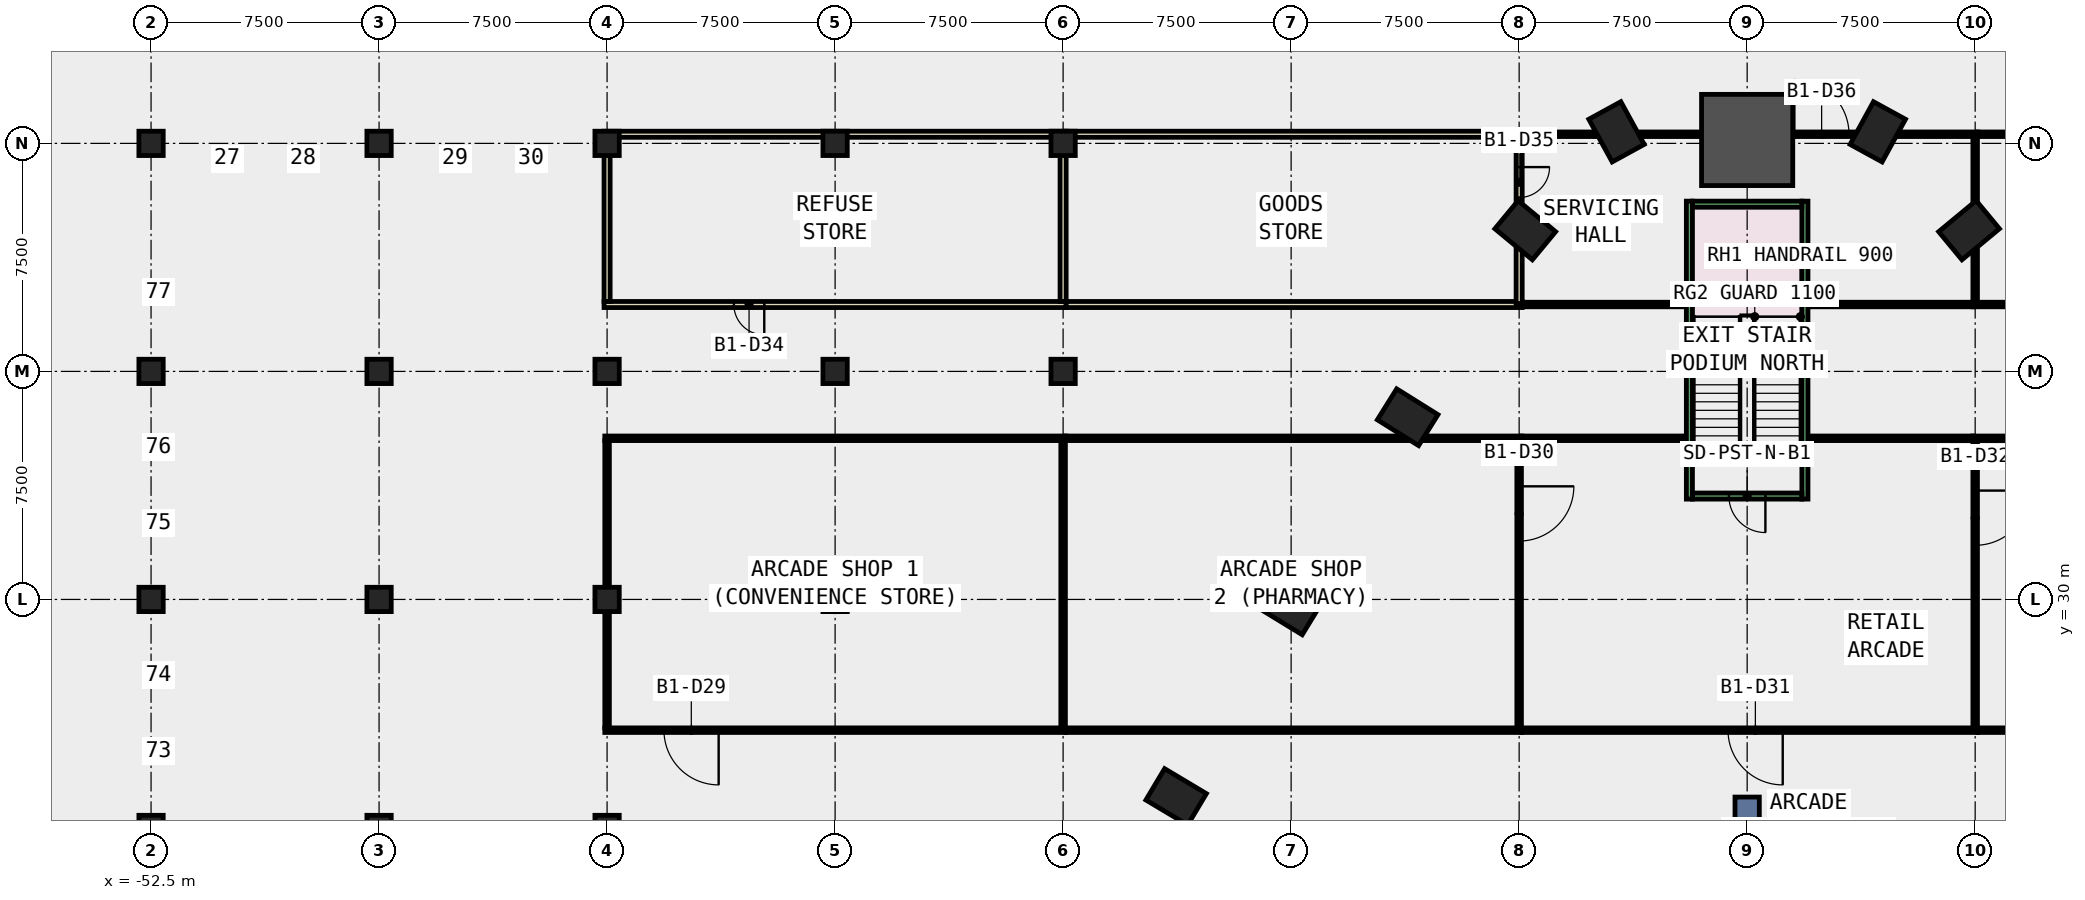
"""IFC4 building model, lengths in metres.
Left out: names, types, materials, properties, quantities, classifications, styles, units other than length and angle.
Written with IfcOpenShell. Run it as: python <this file> out.ifc"""

import sys

from ifc_helpers import new_model, si_unit, direction, frame, frame_2d, origin, origin_2d, place, context, subcontext, project, spatial, rectangle, extrude, element, fill, save


model = new_model("IFC4")
c1 = context("Model", 3, precision=1e-05, world=origin(), true_north=direction((0.0, 1.0)))
c2 = subcontext(c1, "Body", "Model", "MODEL_VIEW")
j1 = project(units=[si_unit("LENGTHUNIT", "METRE"), si_unit("PLANEANGLEUNIT", "RADIAN")], contexts=[c1])
p1 = place(None, origin())
s1 = spatial("IfcSite", under=j1, at=p1, CompositionType="ELEMENT")
p2 = place(p1, origin())
s2 = spatial("IfcBuilding", under=s1, at=p2, CompositionType="ELEMENT")
p3 = place(p2, frame((0.0, 0.0, -5.5)))
s3 = spatial("IfcBuildingStorey", under=s2, at=p3, CompositionType="ELEMENT", Elevation=-5.5)
for number, where, z_axis, x_axis in (
    (1, (-52.5, 22.5, -0.42), (0.0, 0.0, 1.0), (1.0, 0.0, 0.0)),
    (2, (-52.5, 30.0, -0.42), (0.0, 0.0, 1.0), (1.0, 0.0, 0.0)),
    (3, (-52.5, 37.5, -0.42), (0.0, 0.0, 1.0), (1.0, 0.0, 0.0)),
    (4, (-52.5, 45.0, -0.42), (0.0, 0.0, 1.0), (1.0, 0.0, 0.0)),
    (5, (-45.0, 22.5, -0.42), (0.0, 0.0, 1.0), (1.0, 0.0, 0.0)),
    (6, (-45.0, 30.0, -0.42), (0.0, 0.0, 1.0), (1.0, 0.0, 0.0)),
    (7, (-45.0, 37.5, -0.42), (0.0, 0.0, 1.0), (1.0, 0.0, 0.0)),
    (8, (-45.0, 45.0, -0.42), (0.0, 0.0, 1.0), (1.0, 0.0, 0.0)),
    (9, (-37.5, 22.5, -0.42), (0.0, 0.0, 1.0), (1.0, 0.0, 0.0)),
    (10, (-37.5, 30.0, -0.42), (0.0, 0.0, 1.0), (1.0, 0.0, 0.0)),
    (11, (-37.5, 37.5, -0.42), (0.0, 0.0, 1.0), (1.0, 0.0, 0.0)),
    (12, (-37.5, 45.0, -0.42), (0.0, 0.0, 1.0), (1.0, 0.0, 0.0)),
    (13, (-30.0, 30.0, -0.42), (0.0, 0.0, 1.0), (1.0, 0.0, 0.0)),
    (14, (-30.0, 37.5, -0.42), (0.0, 0.0, 1.0), (1.0, 0.0, 0.0)),
    (15, (-30.0, 45.0, -0.42), (0.0, 0.0, 1.0), (1.0, 0.0, 0.0)),
    (16, (-22.5, 37.5, -0.42), (0.0, 0.0, 1.0), (1.0, 0.0, 0.0)),
    (17, (-22.5, 45.0, -0.42), (0.0, 0.0, 1.0), (1.0, 0.0, 0.0)),
):
    element("IfcColumn", number, at=place(p3, frame(where, z_axis=z_axis, x_axis=x_axis)), inside=s3, PredefinedType="COLUMN", context=c2, shape_type="SweptSolid", body=[
        extrude(rectangle(XDim=0.8, YDim=0.8, at=origin_2d()), origin(), (0.0, 0.0, 1.0), 5.72),
    ])
for number, where, z_axis, x_axis in (
    (18, (7.299, 42.144, -0.42), (0.0, 0.0, 1.0), (-0.638, 0.77, 0.0)),
    (19, (4.297, 45.38, -0.42), (0.0, 0.0, 1.0), (-0.877, 0.48, 0.0)),
):
    element("IfcColumn", number, at=place(p3, frame(where, z_axis=z_axis, x_axis=x_axis)), inside=s3, PredefinedType="COLUMN", context=c2, shape_type="SweptSolid", body=[
        extrude(rectangle(XDim=1.2, YDim=1.6, at=origin_2d()), origin(), (0.0, 0.0, 1.0), 5.42),
    ])
p4 = place(p3, frame((0.0, 45.112, -0.42), z_axis=(0.0, 0.0, 1.0), x_axis=(0.0, 1.0, 0.0)))
e20 = element("IfcColumn", 20, at=p4, inside=s3, PredefinedType="COLUMN", context=c2, shape_type="SweptSolid", body=[
    extrude(rectangle(XDim=3.0, YDim=3.0, at=origin_2d()), origin(), (0.0, 0.0, 1.0), 5.42),
])
for number, where, z_axis, x_axis in (
    (21, (-4.297, 45.38, -0.42), (0.0, 0.0, 1.0), (0.877, 0.48, 0.0)),
    (22, (-7.299, 42.144, -0.42), (0.0, 0.0, 1.0), (0.638, 0.77, 0.0)),
    (23, (-11.167, 35.993, -0.42), (0.0, 0.0, 1.0), (0.53, 0.848, 0.0)),
    (24, (-15.005, 29.769, -0.42), (0.0, 0.0, 1.0), (0.522, 0.853, 0.0)),
    (25, (-18.782, 23.508, -0.42), (0.0, 0.0, 1.0), (0.513, 0.858, 0.0)),
):
    element("IfcColumn", number, at=place(p3, frame(where, z_axis=z_axis, x_axis=x_axis)), inside=s3, PredefinedType="COLUMN", context=c2, shape_type="SweptSolid", body=[
        extrude(rectangle(XDim=1.2, YDim=1.6, at=origin_2d()), origin(), (0.0, 0.0, 1.0), 5.42),
    ])
p5 = place(p3, frame((0.0, 14.5, -0.42), z_axis=(0.0, 0.0, 1.0), x_axis=(0.0, 1.0, 0.0)))
e26 = element("IfcWall", 26, at=p5, inside=s3, PredefinedType="SHEAR", context=c2, shape_type="SweptSolid", body=[
    extrude(rectangle(XDim=9.0, YDim=0.8, at=frame_2d((4.5, 0.0))), origin(), (0.0, 0.0, 1.0), 5.42),
])
p6 = place(p3, frame((-37.575, 35.3, 0.0), z_axis=(0.0, 0.0, 1.0), x_axis=(1.0, 0.0, 0.0)))
e27 = element("IfcWall", 27, at=p6, inside=s3, PredefinedType="PARTITIONING", context=c2, shape_type="SweptSolid", body=[
    extrude(rectangle(XDim=15.15, YDim=0.15, at=frame_2d((7.575, 0.0))), origin(), (0.0, 0.0, 1.0), 4.9),
])
p7 = place(p3, frame((-22.425, 25.7, 0.0), z_axis=(0.0, 0.0, 1.0), x_axis=(-1.0, 0.0, 0.0)))
e28 = element("IfcWall", 28, at=p7, inside=s3, PredefinedType="PARTITIONING", context=c2, shape_type="SweptSolid", body=[
    extrude(rectangle(XDim=15.15, YDim=0.15, at=frame_2d((7.575, 0.0))), origin(), (0.0, 0.0, 1.0), 4.9),
])
p8 = place(p7, frame((11.405, 0.0, 0.0)))
e29 = element("IfcOpeningElement", 29, at=p8, cuts=e28, PredefinedType="OPENING", context=c2, shape_type="SweptSolid", body=[
    extrude(rectangle(XDim=1.8, YDim=2.1, at=frame_2d((0.9, 1.05))), frame((0.0, 0.085, 0.0), z_axis=(0.0, -1.0, 0.0), x_axis=(1.0, 0.0, 0.0)), (0.0, 0.0, 1.0), 0.17),
])
p9 = place(p3, frame((-37.5, 25.775, 0.0), z_axis=(0.0, 0.0, 1.0), x_axis=(0.0, 1.0, 0.0)))
e30 = element("IfcWall", 30, at=p9, inside=s3, PredefinedType="PARTITIONING", context=c2, shape_type="SweptSolid", body=[
    extrude(rectangle(XDim=9.45, YDim=0.15, at=frame_2d((4.725, 0.0))), origin(), (0.0, 0.0, 1.0), 4.9),
])
for number, where, z_axis, x_axis in (
    (31, (-22.425, 35.3, 0.0), (0.0, 0.0, 1.0), (1.0, 0.0, 0.0)),
    (32, (-7.425, 25.7, 0.0), (0.0, 0.0, 1.0), (-1.0, 0.0, 0.0)),
):
    element("IfcWall", number, at=place(p3, frame(where, z_axis=z_axis, x_axis=x_axis)), inside=s3, PredefinedType="PARTITIONING", context=c2, shape_type="SweptSolid", body=[
        extrude(rectangle(XDim=15.0, YDim=0.15, at=frame_2d((7.5, 0.0))), origin(), (0.0, 0.0, 1.0), 4.9),
    ])
for number, where, z_axis, x_axis in (
    (33, (-7.425, 35.3, 0.0), (0.0, 0.0, 1.0), (1.0, 0.0, 0.0)),
    (34, (2.0, 35.3, 0.0), (0.0, 0.0, 1.0), (1.0, 0.0, 0.0)),
):
    element("IfcWall", number, at=place(p3, frame(where, z_axis=z_axis, x_axis=x_axis)), inside=s3, PredefinedType="PARTITIONING", context=c2, shape_type="SweptSolid", body=[
        extrude(rectangle(XDim=5.425, YDim=0.15, at=frame_2d((2.712, 0.0))), origin(), (0.0, 0.0, 1.0), 4.9),
    ])
p10 = place(p3, frame((7.575, 25.7, 0.0), z_axis=(0.0, 0.0, 1.0), x_axis=(-1.0, 0.0, 0.0)))
e35 = element("IfcWall", 35, at=p10, inside=s3, PredefinedType="PARTITIONING", context=c2, shape_type="SweptSolid", body=[
    extrude(rectangle(XDim=15.0, YDim=0.15, at=frame_2d((7.5, 0.0))), origin(), (0.0, 0.0, 1.0), 4.9),
])
p11 = place(p10, frame((6.405, 0.0, 0.0)))
e36 = element("IfcOpeningElement", 36, at=p11, cuts=e35, PredefinedType="OPENING", context=c2, shape_type="SweptSolid", body=[
    extrude(rectangle(XDim=1.8, YDim=2.1, at=frame_2d((0.9, 1.05))), frame((0.0, 0.085, 0.0), z_axis=(0.0, -1.0, 0.0), x_axis=(1.0, 0.0, 0.0)), (0.0, 0.0, 1.0), 0.17),
])
p12 = place(p3, frame((7.425, 35.3, 0.0), z_axis=(0.0, 0.0, 1.0), x_axis=(1.0, 0.0, 0.0)))
e37 = element("IfcWall", 37, at=p12, inside=s3, PredefinedType="PARTITIONING", context=c2, shape_type="SweptSolid", body=[
    extrude(rectangle(XDim=15.15, YDim=0.15, at=frame_2d((7.575, 0.0))), origin(), (0.0, 0.0, 1.0), 4.9),
])
p13 = place(p3, frame((22.575, 25.7, 0.0), z_axis=(0.0, 0.0, 1.0), x_axis=(-1.0, 0.0, 0.0)))
e38 = element("IfcWall", 38, at=p13, inside=s3, PredefinedType="PARTITIONING", context=c2, shape_type="SweptSolid", body=[
    extrude(rectangle(XDim=15.0, YDim=0.15, at=frame_2d((7.5, 0.0))), origin(), (0.0, 0.0, 1.0), 4.9),
])
p14 = place(p3, frame((-37.6, 45.3, 0.0), z_axis=(0.0, 0.0, 1.0), x_axis=(1.0, 0.0, 0.0)))
e39 = element("IfcWall", 39, at=p14, inside=s3, PredefinedType="PARTITIONING", context=c2, shape_type="SweptSolid", body=[
    extrude(rectangle(XDim=15.2, YDim=0.2, at=frame_2d((7.6, 0.0))), origin(), (0.0, 0.0, 1.0), 4.9),
])
p15 = place(p3, frame((-22.4, 39.7, 0.0), z_axis=(0.0, 0.0, 1.0), x_axis=(-1.0, 0.0, 0.0)))
e40 = element("IfcWall", 40, at=p15, inside=s3, PredefinedType="PARTITIONING", context=c2, shape_type="SweptSolid", body=[
    extrude(rectangle(XDim=15.2, YDim=0.2, at=frame_2d((7.6, 0.0))), origin(), (0.0, 0.0, 1.0), 4.9),
])
p16 = place(p15, frame((9.93, 0.0, 0.0)))
e41 = element("IfcOpeningElement", 41, at=p16, cuts=e40, PredefinedType="OPENING", context=c2, shape_type="SweptSolid", body=[
    extrude(rectangle(XDim=1.0, YDim=2.1, at=frame_2d((0.5, 1.05))), frame((0.0, 0.11, 0.0), z_axis=(0.0, -1.0, 0.0), x_axis=(1.0, 0.0, 0.0)), (0.0, 0.0, 1.0), 0.22),
])
p17 = place(p3, frame((-37.5, 39.8, 0.0), z_axis=(0.0, 0.0, 1.0), x_axis=(0.0, 1.0, 0.0)))
e42 = element("IfcWall", 42, at=p17, inside=s3, PredefinedType="PARTITIONING", context=c2, shape_type="SweptSolid", body=[
    extrude(rectangle(XDim=5.4, YDim=0.2, at=frame_2d((2.7, 0.0))), origin(), (0.0, 0.0, 1.0), 4.9),
])
for number, where, z_axis, x_axis in (
    (43, (-22.4, 45.3, 0.0), (0.0, 0.0, 1.0), (1.0, 0.0, 0.0)),
    (44, (-7.4, 39.7, 0.0), (0.0, 0.0, 1.0), (-1.0, 0.0, 0.0)),
):
    element("IfcWall", number, at=place(p3, frame(where, z_axis=z_axis, x_axis=x_axis)), inside=s3, PredefinedType="PARTITIONING", context=c2, shape_type="SweptSolid", body=[
        extrude(rectangle(XDim=15.0, YDim=0.2, at=frame_2d((7.5, 0.0))), origin(), (0.0, 0.0, 1.0), 4.9),
    ])
p18 = place(p3, frame((-7.4, 45.3, 0.0), z_axis=(0.0, 0.0, 1.0), x_axis=(1.0, 0.0, 0.0)))
e45 = element("IfcWall", 45, at=p18, inside=s3, PredefinedType="PARTITIONING", context=c2, shape_type="SweptSolid", body=[
    extrude(rectangle(XDim=14.975, YDim=0.15, at=frame_2d((7.487, 0.0))), origin(), (0.0, 0.0, 1.0), 4.9),
])
p19 = place(p18, frame((8.95, 0.0, 0.0)))
e46 = element("IfcOpeningElement", 46, at=p19, cuts=e45, PredefinedType="OPENING", context=c2, shape_type="SweptSolid", body=[
    extrude(rectangle(XDim=1.8, YDim=2.1, at=frame_2d((0.9, 1.05))), frame((0.0, 0.085, 0.0), z_axis=(0.0, -1.0, 0.0), x_axis=(1.0, 0.0, 0.0)), (0.0, 0.0, 1.0), 0.17),
])
p20 = place(p3, frame((7.425, 39.7, 0.0), z_axis=(0.0, 0.0, 1.0), x_axis=(-1.0, 0.0, 0.0)))
e47 = element("IfcWall", 47, at=p20, inside=s3, PredefinedType="PARTITIONING", context=c2, shape_type="SweptSolid", body=[
    extrude(rectangle(XDim=5.425, YDim=0.15, at=frame_2d((2.712, 0.0))), origin(), (0.0, 0.0, 1.0), 4.9),
])
p21 = place(p3, frame((-2.0, 39.7, 0.0), z_axis=(0.0, 0.0, 1.0), x_axis=(-1.0, 0.0, 0.0)))
e48 = element("IfcWall", 48, at=p21, inside=s3, PredefinedType="PARTITIONING", context=c2, shape_type="SweptSolid", body=[
    extrude(rectangle(XDim=5.4, YDim=0.15, at=frame_2d((2.7, 0.0))), origin(), (0.0, 0.0, 1.0), 4.9),
])
p22 = place(p3, frame((7.575, 45.3, 0.0), z_axis=(0.0, 0.0, 1.0), x_axis=(1.0, 0.0, 0.0)))
e49 = element("IfcWall", 49, at=p22, inside=s3, PredefinedType="PARTITIONING", context=c2, shape_type="SweptSolid", body=[
    extrude(rectangle(XDim=15.025, YDim=0.15, at=frame_2d((7.513, 0.0))), origin(), (0.0, 0.0, 1.0), 4.9),
])
p23 = place(p3, frame((22.6, 39.7, 0.0), z_axis=(0.0, 0.0, 1.0), x_axis=(-1.0, 0.0, 0.0)))
e50 = element("IfcWall", 50, at=p23, inside=s3, PredefinedType="PARTITIONING", context=c2, shape_type="SweptSolid", body=[
    extrude(rectangle(XDim=15.175, YDim=0.15, at=frame_2d((7.587, 0.0))), origin(), (0.0, 0.0, 1.0), 4.9),
])
p24 = place(p23, frame((8.43, 0.0, 0.0)))
e51 = element("IfcOpeningElement", 51, at=p24, cuts=e50, PredefinedType="OPENING", context=c2, shape_type="SweptSolid", body=[
    extrude(rectangle(XDim=1.8, YDim=2.1, at=frame_2d((0.9, 1.05))), frame((0.0, 0.085, 0.0), z_axis=(0.0, -1.0, 0.0), x_axis=(1.0, 0.0, 0.0)), (0.0, 0.0, 1.0), 0.17),
])
p25 = place(p3, frame((-22.5, 35.225, 0.0), z_axis=(0.0, 0.0, 1.0), x_axis=(0.0, -1.0, 0.0)))
e52 = element("IfcWall", 52, at=p25, inside=s3, PredefinedType="PARTITIONING", context=c2, shape_type="SweptSolid", body=[
    extrude(rectangle(XDim=9.45, YDim=0.15, at=frame_2d((4.725, 0.0))), origin(), (0.0, 0.0, 1.0), 4.9),
])
p26 = place(p3, frame((-7.5, 35.3, 0.0), z_axis=(0.0, 0.0, 1.0), x_axis=(0.0, -1.0, 0.0)))
e53 = element("IfcWall", 53, at=p26, inside=s3, PredefinedType="PARTITIONING", context=c2, shape_type="SweptSolid", body=[
    extrude(rectangle(XDim=9.525, YDim=0.15, at=frame_2d((4.763, 0.0))), origin(), (0.0, 0.0, 1.0), 4.9),
])
p27 = place(p26, frame((1.58, 0.0, 0.0)))
e54 = element("IfcOpeningElement", 54, at=p27, cuts=e53, PredefinedType="OPENING", context=c2, shape_type="SweptSolid", body=[
    extrude(rectangle(XDim=1.8, YDim=2.1, at=frame_2d((0.9, 1.05))), frame((0.0, 0.085, 0.0), z_axis=(0.0, -1.0, 0.0), x_axis=(1.0, 0.0, 0.0)), (0.0, 0.0, 1.0), 0.17),
])
p28 = place(p3, frame((7.5, 35.3, 0.0), z_axis=(0.0, 0.0, 1.0), x_axis=(0.0, -1.0, 0.0)))
e55 = element("IfcWall", 55, at=p28, inside=s3, PredefinedType="PARTITIONING", context=c2, shape_type="SweptSolid", body=[
    extrude(rectangle(XDim=9.525, YDim=0.15, at=frame_2d((4.763, 0.0))), origin(), (0.0, 0.0, 1.0), 4.9),
])
p29 = place(p28, frame((1.72, 0.0, 0.0)))
e56 = element("IfcOpeningElement", 56, at=p29, cuts=e55, PredefinedType="OPENING", context=c2, shape_type="SweptSolid", body=[
    extrude(rectangle(XDim=1.8, YDim=2.1, at=frame_2d((0.9, 1.05))), frame((0.0, 0.085, 0.0), z_axis=(0.0, -1.0, 0.0), x_axis=(1.0, 0.0, 0.0)), (0.0, 0.0, 1.0), 0.17),
])
p30 = place(p3, frame((-22.5, 45.2, 0.0), z_axis=(0.0, 0.0, 1.0), x_axis=(0.0, -1.0, 0.0)))
e57 = element("IfcWall", 57, at=p30, inside=s3, PredefinedType="PARTITIONING", context=c2, shape_type="SweptSolid", body=[
    extrude(rectangle(XDim=5.4, YDim=0.2, at=frame_2d((2.7, 0.0))), origin(), (0.0, 0.0, 1.0), 4.9),
])
p31 = place(p3, frame((-7.5, 45.2, 0.0), z_axis=(0.0, 0.0, 1.0), x_axis=(0.0, -1.0, 0.0)))
e58 = element("IfcWall", 58, at=p31, inside=s3, PredefinedType="PARTITIONING", context=c2, shape_type="SweptSolid", body=[
    extrude(rectangle(XDim=5.475, YDim=0.2, at=frame_2d((2.737, 0.0))), origin(), (0.0, 0.0, 1.0), 4.9),
])
p32 = place(p31, frame((0.98, 0.0, 0.0)))
e59 = element("IfcOpeningElement", 59, at=p32, cuts=e58, PredefinedType="OPENING", context=c2, shape_type="SweptSolid", body=[
    extrude(rectangle(XDim=1.0, YDim=2.1, at=frame_2d((0.5, 1.05))), frame((0.0, 0.11, 0.0), z_axis=(0.0, -1.0, 0.0), x_axis=(1.0, 0.0, 0.0)), (0.0, 0.0, 1.0), 0.22),
])
p33 = place(p3, frame((7.5, 45.225, 0.0), z_axis=(0.0, 0.0, 1.0), x_axis=(0.0, -1.0, 0.0)))
e60 = element("IfcWall", 60, at=p33, inside=s3, PredefinedType="PARTITIONING", context=c2, shape_type="SweptSolid", body=[
    extrude(rectangle(XDim=5.525, YDim=0.15, at=frame_2d((2.763, 0.0))), origin(), (0.0, 0.0, 1.0), 4.9),
])
for number, where, z_axis, x_axis in (
    (61, (1.9, 33.3, 0.0), (0.0, 0.0, 1.0), (0.0, 1.0, 0.0)),
    (62, (-1.9, 33.3, 0.0), (0.0, 0.0, 1.0), (0.0, 1.0, 0.0)),
):
    element("IfcWall", number, at=place(p3, frame(where, z_axis=z_axis, x_axis=x_axis)), inside=s3, PredefinedType="STANDARD", context=c2, shape_type="SweptSolid", body=[
        extrude(rectangle(XDim=9.8, YDim=0.2, at=frame_2d((4.9, 0.0))), origin(), (0.0, 0.0, 1.0), 4.9),
    ])
p34 = place(p3, frame((1.8, 33.4, 0.0), z_axis=(0.0, 0.0, 1.0), x_axis=(-1.0, 0.0, 0.0)))
e63 = element("IfcWall", 63, at=p34, inside=s3, PredefinedType="STANDARD", context=c2, shape_type="SweptSolid", body=[
    extrude(rectangle(XDim=3.6, YDim=0.2, at=frame_2d((1.8, 0.0))), origin(), (0.0, 0.0, 1.0), 4.9),
])
p35 = place(p34, frame((1.2, 0.0, 0.0)))
e64 = element("IfcOpeningElement", 64, at=p35, cuts=e63, PredefinedType="OPENING", context=c2, shape_type="SweptSolid", body=[
    extrude(rectangle(XDim=1.2, YDim=2.2, at=frame_2d((0.6, 1.1))), frame((0.0, 0.11, 0.0), z_axis=(0.0, -1.0, 0.0), x_axis=(1.0, 0.0, 0.0)), (0.0, 0.0, 1.0), 0.22),
])
p36 = place(p3, frame((1.8, 43.0, 0.0), z_axis=(0.0, 0.0, 1.0), x_axis=(-1.0, 0.0, 0.0)))
e65 = element("IfcWall", 65, at=p36, inside=s3, PredefinedType="STANDARD", context=c2, shape_type="SweptSolid", body=[
    extrude(rectangle(XDim=3.6, YDim=0.2, at=frame_2d((1.8, 0.0))), origin(), (0.0, 0.0, 1.0), 4.9),
])
p37 = place(p8, origin())
e66 = element("IfcDoor", 66, at=p37, inside=s3, OperationType="DOUBLE_DOOR_SINGLE_SWING", PredefinedType="DOOR", context=c2, shape_type="SweptSolid", body=[
    extrude(rectangle(XDim=1.8, YDim=2.1, at=frame_2d((0.9, 1.05))), frame((0.0, 0.025, 0.0), z_axis=(0.0, -1.0, 0.0), x_axis=(1.0, 0.0, 0.0)), (0.0, 0.0, 1.0), 0.05),
])
fill(e29, e66)
p38 = place(p27, origin())
e67 = element("IfcDoor", 67, at=p38, inside=s3, OperationType="DOUBLE_DOOR_SINGLE_SWING", PredefinedType="DOOR", context=c2, shape_type="SweptSolid", body=[
    extrude(rectangle(XDim=1.8, YDim=2.1, at=frame_2d((0.9, 1.05))), frame((0.0, 0.025, 0.0), z_axis=(0.0, -1.0, 0.0), x_axis=(1.0, 0.0, 0.0)), (0.0, 0.0, 1.0), 0.05),
])
fill(e54, e67)
p39 = place(p11, origin())
e68 = element("IfcDoor", 68, at=p39, inside=s3, OperationType="DOUBLE_DOOR_SINGLE_SWING", PredefinedType="DOOR", context=c2, shape_type="SweptSolid", body=[
    extrude(rectangle(XDim=1.8, YDim=2.1, at=frame_2d((0.9, 1.05))), frame((0.0, 0.025, 0.0), z_axis=(0.0, -1.0, 0.0), x_axis=(1.0, 0.0, 0.0)), (0.0, 0.0, 1.0), 0.05),
])
fill(e36, e68)
p40 = place(p29, origin())
e69 = element("IfcDoor", 69, at=p40, inside=s3, OperationType="DOUBLE_DOOR_SINGLE_SWING", PredefinedType="DOOR", context=c2, shape_type="SweptSolid", body=[
    extrude(rectangle(XDim=1.8, YDim=2.1, at=frame_2d((0.9, 1.05))), frame((0.0, 0.025, 0.0), z_axis=(0.0, -1.0, 0.0), x_axis=(1.0, 0.0, 0.0)), (0.0, 0.0, 1.0), 0.05),
])
fill(e56, e69)
p41 = place(p16, origin())
e70 = element("IfcDoor", 70, at=p41, inside=s3, OperationType="SINGLE_SWING_RIGHT", PredefinedType="DOOR", context=c2, shape_type="SweptSolid", body=[
    extrude(rectangle(XDim=1.0, YDim=2.1, at=frame_2d((0.5, 1.05))), frame((0.0, 0.025, 0.0), z_axis=(0.0, -1.0, 0.0), x_axis=(1.0, 0.0, 0.0)), (0.0, 0.0, 1.0), 0.05),
])
fill(e41, e70)
p42 = place(p32, origin())
e71 = element("IfcDoor", 71, at=p42, inside=s3, OperationType="SINGLE_SWING_LEFT", PredefinedType="DOOR", context=c2, shape_type="SweptSolid", body=[
    extrude(rectangle(XDim=1.0, YDim=2.1, at=frame_2d((0.5, 1.05))), frame((0.0, 0.025, 0.0), z_axis=(0.0, -1.0, 0.0), x_axis=(1.0, 0.0, 0.0)), (0.0, 0.0, 1.0), 0.05),
])
fill(e59, e71)
p43 = place(p19, origin())
e72 = element("IfcDoor", 72, at=p43, inside=s3, OperationType="DOUBLE_DOOR_SINGLE_SWING", PredefinedType="DOOR", context=c2, shape_type="SweptSolid", body=[
    extrude(rectangle(XDim=1.8, YDim=2.1, at=frame_2d((0.9, 1.05))), frame((0.0, 0.025, 0.0), z_axis=(0.0, -1.0, 0.0), x_axis=(1.0, 0.0, 0.0)), (0.0, 0.0, 1.0), 0.05),
])
fill(e46, e72)
p44 = place(p35, origin())
e73 = element("IfcDoor", 73, at=p44, inside=s3, OperationType="SINGLE_SWING_LEFT", PredefinedType="DOOR", context=c2, shape_type="SweptSolid", body=[
    extrude(rectangle(XDim=1.2, YDim=2.2, at=frame_2d((0.6, 1.1))), frame((0.0, 0.025, 0.0), z_axis=(0.0, -1.0, 0.0), x_axis=(1.0, 0.0, 0.0)), (0.0, 0.0, 1.0), 0.05),
])
fill(e64, e73)
save(model, sys.argv[1])
